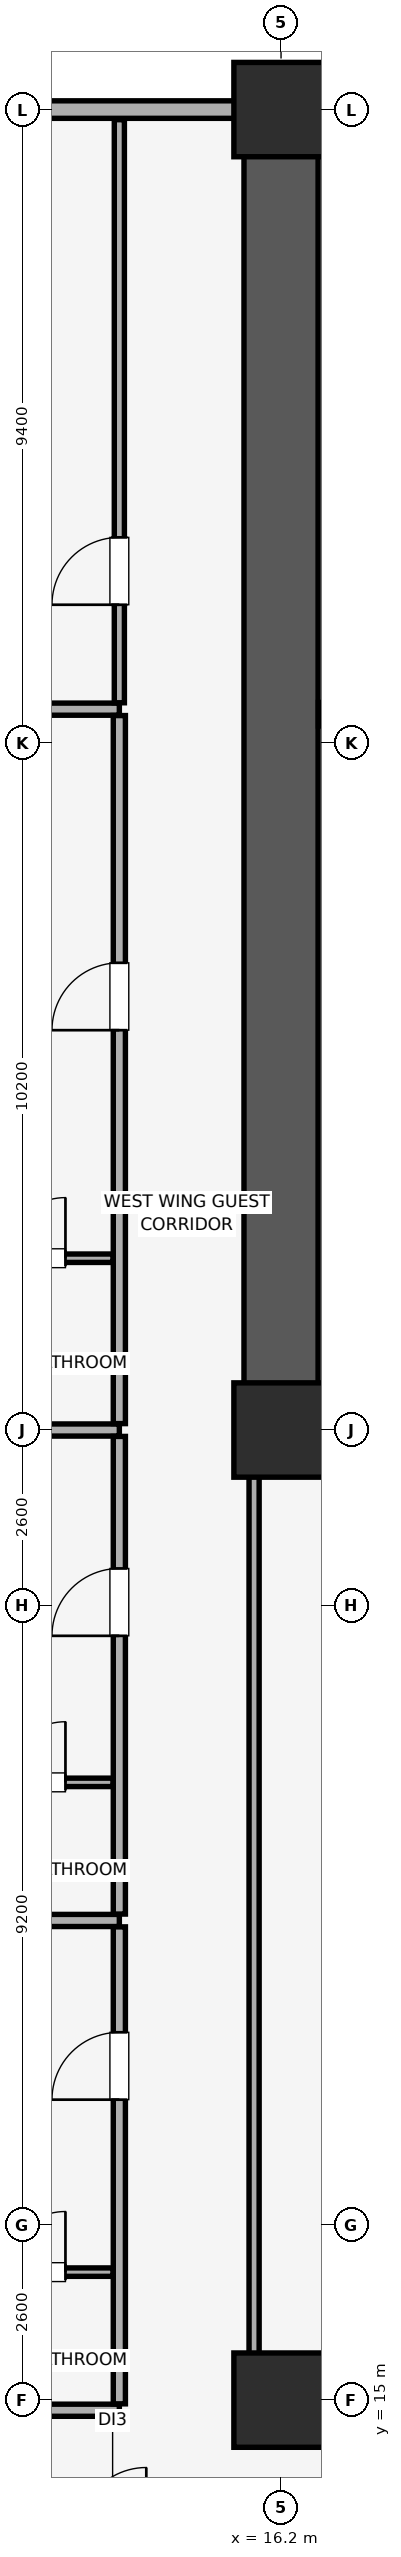
"""IFC4 building model, lengths in metres.
Left out: names, types, materials, properties, quantities, classifications, styles, units other than length and angle.
Written with IfcOpenShell. Run it as: python <this file> out.ifc"""

import sys

from ifc_helpers import new_model, si_unit, direction, frame, frame_2d, origin, origin_2d, place, context, subcontext, project, spatial, rectangle, extrude, element, fill, save


model = new_model("IFC4")
c1 = context("Model", 3, precision=1e-05, world=origin(), true_north=direction((0.0, 1.0)))
c2 = subcontext(c1, "Body", "Model", "MODEL_VIEW")
j1 = project(units=[si_unit("LENGTHUNIT", "METRE"), si_unit("PLANEANGLEUNIT", "RADIAN")], contexts=[c1])
p1 = place(None, origin())
s1 = spatial("IfcSite", under=j1, at=p1, CompositionType="ELEMENT")
p2 = place(p1, origin())
s2 = spatial("IfcBuilding", under=s1, at=p2, CompositionType="ELEMENT")
p3 = place(p2, frame((0.0, 0.0, 68.9)))
s3 = spatial("IfcBuildingStorey", under=s2, at=p3, CompositionType="ELEMENT", Elevation=68.9)
for number, where, z_axis, x_axis in (
    (1, (16.2, 15.0, 0.0), (0.0, 0.0, 1.0), (1.0, 0.0, 0.0)),
    (2, (16.2, 29.4, 0.0), (0.0, 0.0, 1.0), (1.0, 0.0, 0.0)),
    (3, (16.2, 49.0, 0.0), (0.0, 0.0, 1.0), (1.0, 0.0, 0.0)),
):
    element("IfcColumn", number, at=place(p3, frame(where, z_axis=z_axis, x_axis=x_axis)), inside=s3, PredefinedType="COLUMN", context=c2, shape_type="SweptSolid", body=[
        extrude(rectangle(XDim=1.4, YDim=1.4, at=origin_2d()), origin(), (0.0, 0.0, 1.0), 3.51),
    ])
p4 = place(p3, frame((79.8, 49.0, 0.0), z_axis=(0.0, 0.0, 1.0), x_axis=(-1.0, 0.0, 0.0)))
e4 = element("IfcWall", 4, at=p4, inside=s3, PredefinedType="SOLIDWALL", context=c2, shape_type="SweptSolid", body=[
    extrude(rectangle(XDim=75.6, YDim=0.26, at=frame_2d((37.8, 0.0))), origin(), (0.0, 0.0, 1.0), 2.56),
])
p5 = place(p4, frame((72.565, 0.0, 0.85)))
e5 = element("IfcOpeningElement", 5, at=p5, cuts=e4, PredefinedType="OPENING", context=c2, shape_type="SweptSolid", body=[
    extrude(rectangle(XDim=1.5, YDim=1.4, at=frame_2d((0.75, 0.7))), frame((0.0, 0.14, 0.0), z_axis=(0.0, -1.0, 0.0), x_axis=(1.0, 0.0, 0.0)), (0.0, 0.0, 1.0), 0.28),
])
p6 = place(p4, frame((67.45, 0.0, 0.85)))
e6 = element("IfcOpeningElement", 6, at=p6, cuts=e4, PredefinedType="OPENING", context=c2, shape_type="SweptSolid", body=[
    extrude(rectangle(XDim=1.5, YDim=1.4, at=frame_2d((0.75, 0.7))), frame((0.0, 0.14, 0.0), z_axis=(0.0, -1.0, 0.0), x_axis=(1.0, 0.0, 0.0)), (0.0, 0.0, 1.0), 0.28),
])
p7 = place(p4, frame((6.65, 0.0, 0.85)))
e7 = element("IfcOpeningElement", 7, at=p7, cuts=e4, PredefinedType="OPENING", context=c2, shape_type="SweptSolid", body=[
    extrude(rectangle(XDim=1.5, YDim=1.4, at=frame_2d((0.75, 0.7))), frame((0.0, 0.14, 0.0), z_axis=(0.0, -1.0, 0.0), x_axis=(1.0, 0.0, 0.0)), (0.0, 0.0, 1.0), 0.28),
])
p8 = place(p4, frame((1.535, 0.0, 0.85)))
e8 = element("IfcOpeningElement", 8, at=p8, cuts=e4, PredefinedType="OPENING", context=c2, shape_type="SweptSolid", body=[
    extrude(rectangle(XDim=1.5, YDim=1.4, at=frame_2d((0.75, 0.7))), frame((0.0, 0.14, 0.0), z_axis=(0.0, -1.0, 0.0), x_axis=(1.0, 0.0, 0.0)), (0.0, 0.0, 1.0), 0.28),
])
p9 = place(p4, frame((51.365, 0.0, 0.9)))
e9 = element("IfcOpeningElement", 9, at=p9, cuts=e4, PredefinedType="OPENING", context=c2, shape_type="SweptSolid", body=[
    extrude(rectangle(XDim=1.5, YDim=1.4, at=frame_2d((0.75, 0.7))), frame((0.0, 0.14, 0.0), z_axis=(0.0, -1.0, 0.0), x_axis=(1.0, 0.0, 0.0)), (0.0, 0.0, 1.0), 0.28),
])
p10 = place(p4, frame((46.0, 0.0, 0.9)))
e10 = element("IfcOpeningElement", 10, at=p10, cuts=e4, PredefinedType="OPENING", context=c2, shape_type="SweptSolid", body=[
    extrude(rectangle(XDim=1.5, YDim=1.4, at=frame_2d((0.75, 0.7))), frame((0.0, 0.14, 0.0), z_axis=(0.0, -1.0, 0.0), x_axis=(1.0, 0.0, 0.0)), (0.0, 0.0, 1.0), 0.28),
])
p11 = place(p4, frame((29.15, 0.0, 0.9)))
e11 = element("IfcOpeningElement", 11, at=p11, cuts=e4, PredefinedType="OPENING", context=c2, shape_type="SweptSolid", body=[
    extrude(rectangle(XDim=1.5, YDim=1.4, at=frame_2d((0.75, 0.7))), frame((0.0, 0.14, 0.0), z_axis=(0.0, -1.0, 0.0), x_axis=(1.0, 0.0, 0.0)), (0.0, 0.0, 1.0), 0.28),
])
p12 = place(p4, frame((23.485, 0.0, 0.9)))
e12 = element("IfcOpeningElement", 12, at=p12, cuts=e4, PredefinedType="OPENING", context=c2, shape_type="SweptSolid", body=[
    extrude(rectangle(XDim=1.5, YDim=1.4, at=frame_2d((0.75, 0.7))), frame((0.0, 0.14, 0.0), z_axis=(0.0, -1.0, 0.0), x_axis=(1.0, 0.0, 0.0)), (0.0, 0.0, 1.0), 0.28),
])
p13 = place(p3, frame((16.2, 29.4, 0.0), z_axis=(0.0, 0.0, 1.0), x_axis=(0.0, 1.0, 0.0)))
e13 = element("IfcWall", 13, at=p13, inside=s3, PredefinedType="SHEAR", context=c2, shape_type="SweptSolid", body=[
    extrude(rectangle(XDim=19.2, YDim=1.1, at=frame_2d((9.6, 0.0))), origin(), (0.0, 0.0, 1.0), 3.51),
])
p14 = place(p3, frame((16.755, 29.4, 0.0), z_axis=(0.0, 0.0, 1.0), x_axis=(1.0, 0.0, 0.0)))
e14 = element("IfcWall", 14, at=p14, inside=s3, PredefinedType="SHEAR", context=c2, shape_type="SweptSolid", body=[
    extrude(rectangle(XDim=6.845, YDim=1.1, at=frame_2d((3.423, 0.0))), origin(), (0.0, 0.0, 1.0), 3.51),
])
p15 = place(p3, frame((16.755, 40.025, 0.0), z_axis=(0.0, 0.0, 1.0), x_axis=(1.0, 0.0, 0.0)))
e15 = element("IfcWall", 15, at=p15, inside=s3, PredefinedType="SHEAR", context=c2, shape_type="SweptSolid", body=[
    extrude(rectangle(XDim=4.1, YDim=0.35, at=frame_2d((2.05, 0.0))), origin(), (0.0, 0.0, 1.0), 3.51),
])
p16 = place(p15, frame((1.71, 0.0, 0.0)))
e16 = element("IfcOpeningElement", 16, at=p16, cuts=e15, PredefinedType="OPENING", context=c2, shape_type="SweptSolid", body=[
    extrude(rectangle(XDim=1.15, YDim=2.15, at=frame_2d((0.575, 1.075))), frame((0.0, 0.185, 0.0), z_axis=(0.0, -1.0, 0.0), x_axis=(1.0, 0.0, 0.0)), (0.0, 0.0, 1.0), 0.37),
])
p17 = place(p3, frame((15.8, 14.85, 0.0), z_axis=(0.0, 0.0, 1.0), x_axis=(1.0, 0.0, 0.0)))
e17 = element("IfcWall", 17, at=p17, inside=s3, PredefinedType="PARTITIONING", context=c2, shape_type="SweptSolid", body=[
    extrude(rectangle(XDim=9.2, YDim=0.15, at=frame_2d((4.6, 0.0))), origin(), (0.0, 0.0, 1.0), 2.86),
])
p18 = place(p17, frame((4.1, 0.0, 0.0)))
e18 = element("IfcOpeningElement", 18, at=p18, cuts=e17, PredefinedType="OPENING", context=c2, shape_type="SweptSolid", body=[
    extrude(rectangle(XDim=1.0, YDim=2.15, at=frame_2d((0.5, 1.075))), frame((0.0, 0.085, 0.0), z_axis=(0.0, -1.0, 0.0), x_axis=(1.0, 0.0, 0.0)), (0.0, 0.0, 1.0), 0.17),
])
p19 = place(p3, frame((15.8, 14.93, 0.0), z_axis=(0.0, 0.0, 1.0), x_axis=(0.0, 1.0, 0.0)))
e19 = element("IfcWall", 19, at=p19, inside=s3, PredefinedType="PARTITIONING", context=c2, shape_type="SweptSolid", body=[
    extrude(rectangle(XDim=14.46, YDim=0.15, at=frame_2d((7.23, 0.0))), origin(), (0.0, 0.0, 1.0), 3.51),
])
p20 = place(p3, frame((0.15, 14.85, 0.0), z_axis=(0.0, 0.0, 1.0), x_axis=(1.0, 0.0, 0.0)))
e20 = element("IfcWall", 20, at=p20, inside=s3, PredefinedType="PARTITIONING", context=c2, shape_type="SweptSolid", body=[
    extrude(rectangle(XDim=13.65, YDim=0.18, at=frame_2d((6.825, 0.0))), origin(), (0.0, 0.0, 1.0), 2.86),
])
p21 = place(p3, frame((0.15, 22.12, 0.0), z_axis=(0.0, 0.0, 1.0), x_axis=(1.0, 0.0, 0.0)))
e21 = element("IfcWall", 21, at=p21, inside=s3, PredefinedType="PARTITIONING", context=c2, shape_type="SweptSolid", body=[
    extrude(rectangle(XDim=13.65, YDim=0.18, at=frame_2d((6.825, 0.0))), origin(), (0.0, 0.0, 1.0), 3.51),
])
p22 = place(p3, frame((13.8, 14.945, 0.0), z_axis=(0.0, 0.0, 1.0), x_axis=(0.0, 1.0, 0.0)))
e22 = element("IfcWall", 22, at=p22, inside=s3, PredefinedType="PARTITIONING", context=c2, shape_type="SweptSolid", body=[
    extrude(rectangle(XDim=7.08, YDim=0.18, at=frame_2d((3.54, 0.0))), origin(), (0.0, 0.0, 1.0), 3.51),
])
p23 = place(p22, frame((4.515, 0.0, 0.0)))
e23 = element("IfcOpeningElement", 23, at=p23, cuts=e22, PredefinedType="OPENING", context=c2, shape_type="SweptSolid", body=[
    extrude(rectangle(XDim=1.0, YDim=2.15, at=frame_2d((0.5, 1.075))), frame((0.0, 0.1, 0.0), z_axis=(0.0, -1.0, 0.0), x_axis=(1.0, 0.0, 0.0)), (0.0, 0.0, 1.0), 0.2),
])
p24 = place(p3, frame((11.3, 16.9, 0.0), z_axis=(0.0, 0.0, 1.0), x_axis=(1.0, 0.0, 0.0)))
e24 = element("IfcWall", 24, at=p24, inside=s3, PredefinedType="PARTITIONING", context=c2, shape_type="SweptSolid", body=[
    extrude(rectangle(XDim=2.405, YDim=0.125, at=frame_2d((1.203, 0.0))), origin(), (0.0, 0.0, 1.0), 3.51),
])
p25 = place(p24, frame((0.8, 0.0, 0.0)))
e25 = element("IfcOpeningElement", 25, at=p25, cuts=e24, PredefinedType="OPENING", context=c2, shape_type="SweptSolid", body=[
    extrude(rectangle(XDim=0.9, YDim=2.1, at=frame_2d((0.45, 1.05))), frame((0.0, 0.073, 0.0), z_axis=(0.0, -1.0, 0.0), x_axis=(1.0, 0.0, 0.0)), (0.0, 0.0, 1.0), 0.145),
])
p26 = place(p3, frame((0.15, 29.4, 0.0), z_axis=(0.0, 0.0, 1.0), x_axis=(1.0, 0.0, 0.0)))
e26 = element("IfcWall", 26, at=p26, inside=s3, PredefinedType="PARTITIONING", context=c2, shape_type="SweptSolid", body=[
    extrude(rectangle(XDim=13.65, YDim=0.18, at=frame_2d((6.825, 0.0))), origin(), (0.0, 0.0, 1.0), 2.86),
])
p27 = place(p3, frame((13.8, 22.215, 0.0), z_axis=(0.0, 0.0, 1.0), x_axis=(0.0, 1.0, 0.0)))
e27 = element("IfcWall", 27, at=p27, inside=s3, PredefinedType="PARTITIONING", context=c2, shape_type="SweptSolid", body=[
    extrude(rectangle(XDim=7.09, YDim=0.18, at=frame_2d((3.545, 0.0))), origin(), (0.0, 0.0, 1.0), 3.51),
])
p28 = place(p27, frame((4.13, 0.0, 0.0)))
e28 = element("IfcOpeningElement", 28, at=p28, cuts=e27, PredefinedType="OPENING", context=c2, shape_type="SweptSolid", body=[
    extrude(rectangle(XDim=1.0, YDim=2.15, at=frame_2d((0.5, 1.075))), frame((0.0, 0.1, 0.0), z_axis=(0.0, -1.0, 0.0), x_axis=(1.0, 0.0, 0.0)), (0.0, 0.0, 1.0), 0.2),
])
p29 = place(p3, frame((11.3, 24.17, 0.0), z_axis=(0.0, 0.0, 1.0), x_axis=(1.0, 0.0, 0.0)))
e29 = element("IfcWall", 29, at=p29, inside=s3, PredefinedType="PARTITIONING", context=c2, shape_type="SweptSolid", body=[
    extrude(rectangle(XDim=2.405, YDim=0.125, at=frame_2d((1.203, 0.0))), origin(), (0.0, 0.0, 1.0), 3.51),
])
p30 = place(p29, frame((0.8, 0.0, 0.0)))
e30 = element("IfcOpeningElement", 30, at=p30, cuts=e29, PredefinedType="OPENING", context=c2, shape_type="SweptSolid", body=[
    extrude(rectangle(XDim=0.9, YDim=2.1, at=frame_2d((0.45, 1.05))), frame((0.0, 0.073, 0.0), z_axis=(0.0, -1.0, 0.0), x_axis=(1.0, 0.0, 0.0)), (0.0, 0.0, 1.0), 0.145),
])
p31 = place(p3, frame((0.15, 40.1, 0.0), z_axis=(0.0, 0.0, 1.0), x_axis=(1.0, 0.0, 0.0)))
e31 = element("IfcWall", 31, at=p31, inside=s3, PredefinedType="PARTITIONING", context=c2, shape_type="SweptSolid", body=[
    extrude(rectangle(XDim=13.65, YDim=0.18, at=frame_2d((6.825, 0.0))), origin(), (0.0, 0.0, 1.0), 3.51),
])
p32 = place(p3, frame((13.8, 29.495, 0.0), z_axis=(0.0, 0.0, 1.0), x_axis=(0.0, 1.0, 0.0)))
e32 = element("IfcWall", 32, at=p32, inside=s3, PredefinedType="PARTITIONING", context=c2, shape_type="SweptSolid", body=[
    extrude(rectangle(XDim=10.51, YDim=0.18, at=frame_2d((5.255, 0.0))), origin(), (0.0, 0.0, 1.0), 3.51),
])
p33 = place(p32, frame((5.84, 0.0, 0.0)))
e33 = element("IfcOpeningElement", 33, at=p33, cuts=e32, PredefinedType="OPENING", context=c2, shape_type="SweptSolid", body=[
    extrude(rectangle(XDim=1.0, YDim=2.15, at=frame_2d((0.5, 1.075))), frame((0.0, 0.1, 0.0), z_axis=(0.0, -1.0, 0.0), x_axis=(1.0, 0.0, 0.0)), (0.0, 0.0, 1.0), 0.2),
])
p34 = place(p3, frame((11.3, 31.95, 0.0), z_axis=(0.0, 0.0, 1.0), x_axis=(1.0, 0.0, 0.0)))
e34 = element("IfcWall", 34, at=p34, inside=s3, PredefinedType="PARTITIONING", context=c2, shape_type="SweptSolid", body=[
    extrude(rectangle(XDim=2.405, YDim=0.125, at=frame_2d((1.203, 0.0))), origin(), (0.0, 0.0, 1.0), 3.51),
])
p35 = place(p34, frame((0.8, 0.0, 0.0)))
e35 = element("IfcOpeningElement", 35, at=p35, cuts=e34, PredefinedType="OPENING", context=c2, shape_type="SweptSolid", body=[
    extrude(rectangle(XDim=0.9, YDim=2.1, at=frame_2d((0.45, 1.05))), frame((0.0, 0.073, 0.0), z_axis=(0.0, -1.0, 0.0), x_axis=(1.0, 0.0, 0.0)), (0.0, 0.0, 1.0), 0.145),
])
p36 = place(p3, frame((13.8, 40.195, 0.0), z_axis=(0.0, 0.0, 1.0), x_axis=(0.0, 1.0, 0.0)))
e36 = element("IfcWall", 36, at=p36, inside=s3, PredefinedType="PARTITIONING", context=c2, shape_type="SweptSolid", body=[
    extrude(rectangle(XDim=8.655, YDim=0.15, at=frame_2d((4.328, 0.0))), origin(), (0.0, 0.0, 1.0), 3.51),
])
p37 = place(p36, frame((1.455, 0.0, 0.0)))
e37 = element("IfcOpeningElement", 37, at=p37, cuts=e36, PredefinedType="OPENING", context=c2, shape_type="SweptSolid", body=[
    extrude(rectangle(XDim=1.0, YDim=2.15, at=frame_2d((0.5, 1.075))), frame((0.0, 0.085, 0.0), z_axis=(0.0, -1.0, 0.0), x_axis=(1.0, 0.0, 0.0)), (0.0, 0.0, 1.0), 0.17),
])
p38 = place(p23, origin())
e38 = element("IfcDoor", 38, at=p38, inside=s3, OperationType="SINGLE_SWING_LEFT", PredefinedType="DOOR", context=c2, shape_type="SweptSolid", body=[
    extrude(rectangle(XDim=1.0, YDim=2.15, at=frame_2d((0.5, 1.075))), frame((0.0, 0.025, 0.0), z_axis=(0.0, -1.0, 0.0), x_axis=(1.0, 0.0, 0.0)), (0.0, 0.0, 1.0), 0.05),
])
fill(e23, e38)
p39 = place(p25, origin())
e39 = element("IfcDoor", 39, at=p39, inside=s3, OperationType="SINGLE_SWING_RIGHT", PredefinedType="DOOR", context=c2, shape_type="SweptSolid", body=[
    extrude(rectangle(XDim=0.9, YDim=2.1, at=frame_2d((0.45, 1.05))), frame((0.0, 0.025, 0.0), z_axis=(0.0, -1.0, 0.0), x_axis=(1.0, 0.0, 0.0)), (0.0, 0.0, 1.0), 0.05),
])
fill(e25, e39)
p40 = place(p28, origin())
e40 = element("IfcDoor", 40, at=p40, inside=s3, OperationType="SINGLE_SWING_LEFT", PredefinedType="DOOR", context=c2, shape_type="SweptSolid", body=[
    extrude(rectangle(XDim=1.0, YDim=2.15, at=frame_2d((0.5, 1.075))), frame((0.0, 0.025, 0.0), z_axis=(0.0, -1.0, 0.0), x_axis=(1.0, 0.0, 0.0)), (0.0, 0.0, 1.0), 0.05),
])
fill(e28, e40)
p41 = place(p30, origin())
e41 = element("IfcDoor", 41, at=p41, inside=s3, OperationType="SINGLE_SWING_RIGHT", PredefinedType="DOOR", context=c2, shape_type="SweptSolid", body=[
    extrude(rectangle(XDim=0.9, YDim=2.1, at=frame_2d((0.45, 1.05))), frame((0.0, 0.025, 0.0), z_axis=(0.0, -1.0, 0.0), x_axis=(1.0, 0.0, 0.0)), (0.0, 0.0, 1.0), 0.05),
])
fill(e30, e41)
p42 = place(p33, origin())
e42 = element("IfcDoor", 42, at=p42, inside=s3, OperationType="SINGLE_SWING_LEFT", PredefinedType="DOOR", context=c2, shape_type="SweptSolid", body=[
    extrude(rectangle(XDim=1.0, YDim=2.15, at=frame_2d((0.5, 1.075))), frame((0.0, 0.025, 0.0), z_axis=(0.0, -1.0, 0.0), x_axis=(1.0, 0.0, 0.0)), (0.0, 0.0, 1.0), 0.05),
])
fill(e33, e42)
p43 = place(p35, origin())
e43 = element("IfcDoor", 43, at=p43, inside=s3, OperationType="SINGLE_SWING_RIGHT", PredefinedType="DOOR", context=c2, shape_type="SweptSolid", body=[
    extrude(rectangle(XDim=0.9, YDim=2.1, at=frame_2d((0.45, 1.05))), frame((0.0, 0.025, 0.0), z_axis=(0.0, -1.0, 0.0), x_axis=(1.0, 0.0, 0.0)), (0.0, 0.0, 1.0), 0.05),
])
fill(e35, e43)
p44 = place(p37, origin())
e44 = element("IfcDoor", 44, at=p44, inside=s3, OperationType="SINGLE_SWING_LEFT", PredefinedType="DOOR", context=c2, shape_type="SweptSolid", body=[
    extrude(rectangle(XDim=1.0, YDim=2.15, at=frame_2d((0.5, 1.075))), frame((0.0, 0.025, 0.0), z_axis=(0.0, -1.0, 0.0), x_axis=(1.0, 0.0, 0.0)), (0.0, 0.0, 1.0), 0.05),
])
fill(e37, e44)
save(model, sys.argv[1])
